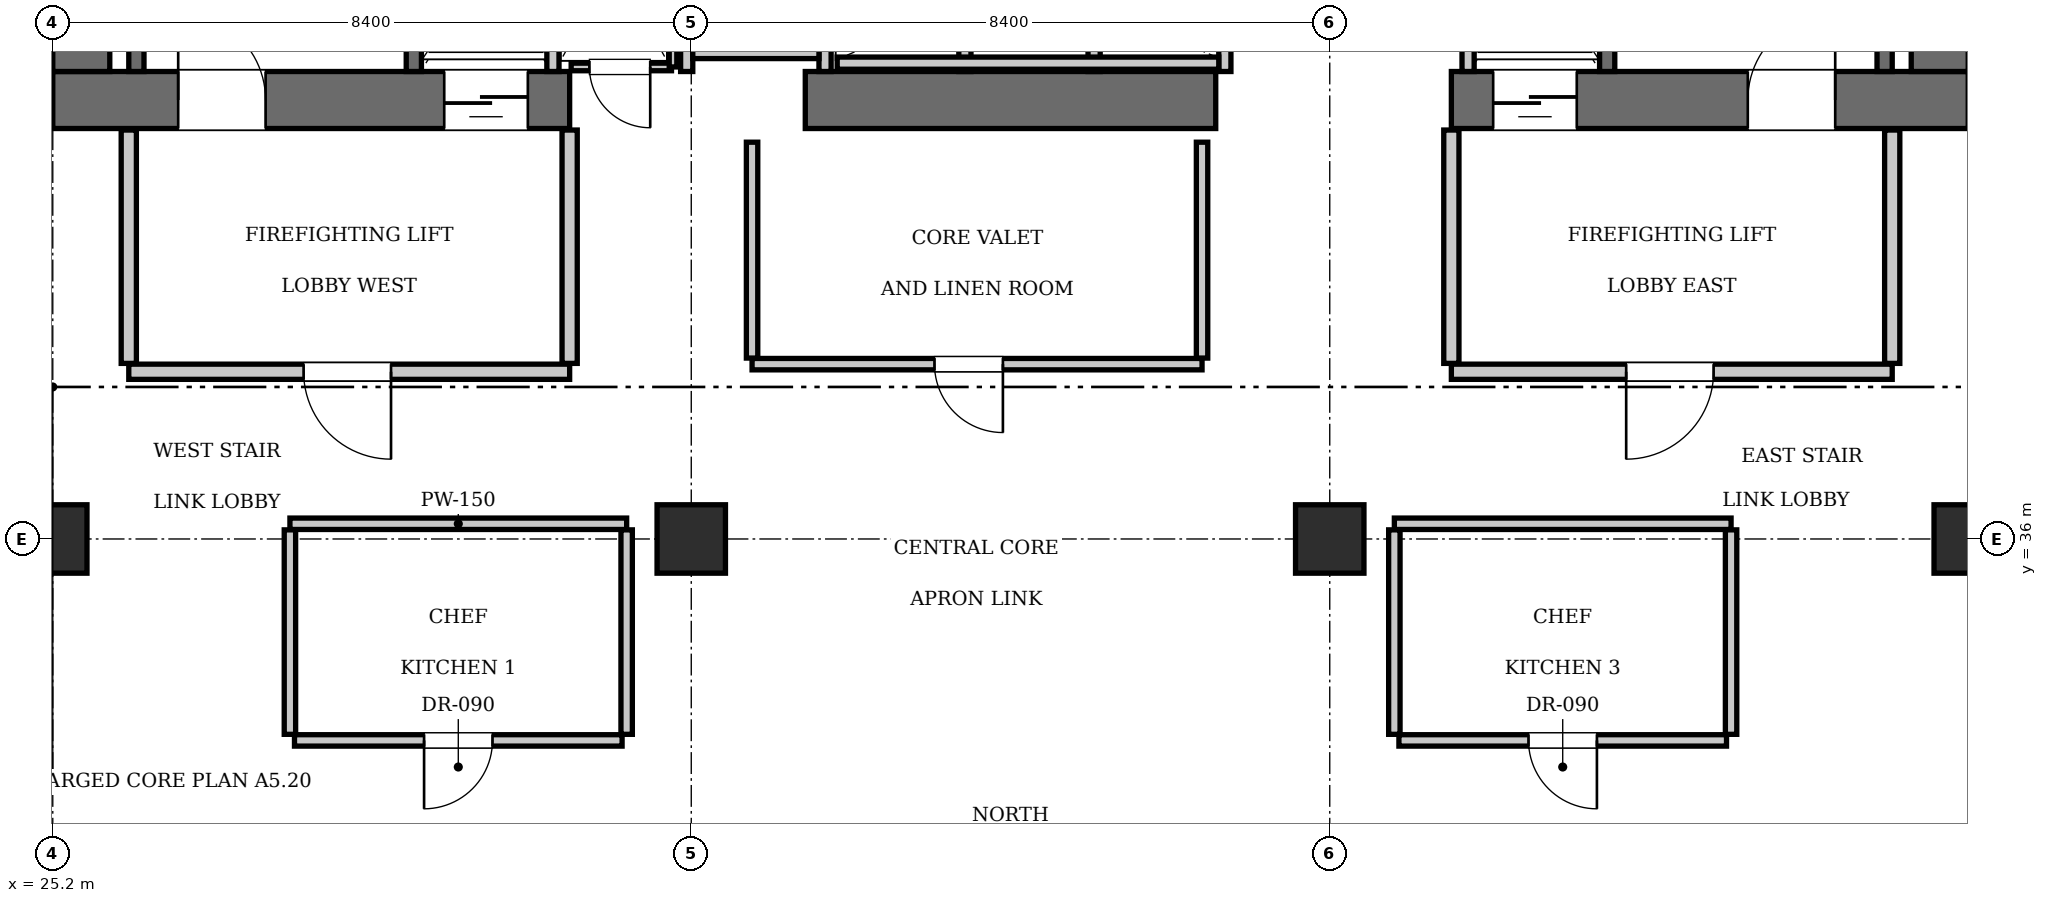
"""IFC4 building model, lengths in metres.
Left out: names, types, materials, properties, quantities, classifications, styles, units other than length and angle.
Written with IfcOpenShell. Run it as: python <this file> out.ifc"""

import sys

from ifc_helpers import new_model, si_unit, direction, frame, frame_2d, origin, origin_2d, place, context, subcontext, project, spatial, rectangle, extrude, element, fill, save


model = new_model("IFC4")
c1 = context("Model", 3, precision=1e-05, world=origin(), true_north=direction((0.0, 1.0)))
c2 = subcontext(c1, "Body", "Model", "MODEL_VIEW")
j1 = project(units=[si_unit("LENGTHUNIT", "METRE"), si_unit("PLANEANGLEUNIT", "RADIAN")], contexts=[c1])
p1 = place(None, origin())
s1 = spatial("IfcSite", under=j1, at=p1, CompositionType="ELEMENT")
p2 = place(p1, origin())
s2 = spatial("IfcBuilding", under=s1, at=p2, CompositionType="ELEMENT")
p3 = place(p2, frame((0.0, 0.0, 162.05)))
s3 = spatial("IfcBuildingStorey", under=s2, at=p3, CompositionType="ELEMENT", Elevation=162.05)
p4 = place(p3, frame((25.2, 41.775, 0.0), z_axis=(0.0, 0.0, 1.0), x_axis=(1.0, 0.0, 0.0)))
e1 = element("IfcWall", 1, at=p4, inside=s3, PredefinedType="SHEAR", context=c2, shape_type="SweptSolid", body=[
    extrude(rectangle(XDim=6.8, YDim=0.75, at=frame_2d((3.4, 0.0))), origin(), (0.0, 0.0, 1.0), 3.85),
])
p5 = place(p4, frame((1.65, 0.0, 0.0)))
e2 = element("IfcOpeningElement", 2, at=p5, cuts=e1, PredefinedType="OPENING", context=c2, shape_type="SweptSolid", body=[
    extrude(rectangle(XDim=1.15, YDim=2.15, at=frame_2d((0.575, 1.075))), frame((0.0, 0.385, 0.0), z_axis=(0.0, -1.0, 0.0), x_axis=(1.0, 0.0, 0.0)), (0.0, 0.0, 1.0), 0.77),
])
p6 = place(p4, frame((5.15, 0.0, 0.0)))
e3 = element("IfcOpeningElement", 3, at=p6, cuts=e1, PredefinedType="OPENING", context=c2, shape_type="SweptSolid", body=[
    extrude(rectangle(XDim=1.1, YDim=2.2, at=frame_2d((0.55, 1.1))), frame((0.0, 0.385, 0.0), z_axis=(0.0, -1.0, 0.0), x_axis=(1.0, 0.0, 0.0)), (0.0, 0.0, 1.0), 0.77),
])
p7 = place(p3, frame((35.1, 41.775, 0.0), z_axis=(0.0, 0.0, 1.0), x_axis=(1.0, 0.0, 0.0)))
e4 = element("IfcWall", 4, at=p7, inside=s3, PredefinedType="SHEAR", context=c2, shape_type="SweptSolid", body=[
    extrude(rectangle(XDim=5.4, YDim=0.75, at=frame_2d((2.7, 0.0))), origin(), (0.0, 0.0, 1.0), 3.85),
])
p8 = place(p3, frame((43.6, 41.775, 0.0), z_axis=(0.0, 0.0, 1.0), x_axis=(1.0, 0.0, 0.0)))
e5 = element("IfcWall", 5, at=p8, inside=s3, PredefinedType="SHEAR", context=c2, shape_type="SweptSolid", body=[
    extrude(rectangle(XDim=6.8, YDim=0.75, at=frame_2d((3.4, 0.0))), origin(), (0.0, 0.0, 1.0), 3.85),
])
p9 = place(p8, frame((3.9, 0.0, 0.0)))
e6 = element("IfcOpeningElement", 6, at=p9, cuts=e5, PredefinedType="OPENING", context=c2, shape_type="SweptSolid", body=[
    extrude(rectangle(XDim=1.15, YDim=2.15, at=frame_2d((0.575, 1.075))), frame((0.0, 0.385, 0.0), z_axis=(0.0, -1.0, 0.0), x_axis=(1.0, 0.0, 0.0)), (0.0, 0.0, 1.0), 0.77),
])
p10 = place(p8, frame((0.55, 0.0, 0.0)))
e7 = element("IfcOpeningElement", 7, at=p10, cuts=e5, PredefinedType="OPENING", context=c2, shape_type="SweptSolid", body=[
    extrude(rectangle(XDim=1.1, YDim=2.2, at=frame_2d((0.55, 1.1))), frame((0.0, 0.385, 0.0), z_axis=(0.0, -1.0, 0.0), x_axis=(1.0, 0.0, 0.0)), (0.0, 0.0, 1.0), 0.77),
])
for number, where, z_axis, x_axis in (
    (8, (25.575, 42.15, 0.0), (0.0, 0.0, 1.0), (0.0, 1.0, 0.0)),
    (9, (50.025, 42.15, 0.0), (0.0, 0.0, 1.0), (0.0, 1.0, 0.0)),
):
    element("IfcWall", number, at=place(p3, frame(where, z_axis=z_axis, x_axis=x_axis)), inside=s3, PredefinedType="SHEAR", context=c2, shape_type="SweptSolid", body=[
        extrude(rectangle(XDim=1.9, YDim=0.75, at=frame_2d((0.95, 0.0))), origin(), (0.0, 0.0, 1.0), 3.85),
    ])
for number, where, z_axis, x_axis in (
    (10, (25.2, 36.0, 0.0), (0.0, 0.0, 1.0), (1.0, 0.0, 0.0)),
    (11, (33.6, 36.0, 0.0), (0.0, 0.0, 1.0), (1.0, 0.0, 0.0)),
    (12, (42.0, 36.0, 0.0), (0.0, 0.0, 1.0), (1.0, 0.0, 0.0)),
    (13, (50.4, 36.0, 0.0), (0.0, 0.0, 1.0), (1.0, 0.0, 0.0)),
):
    element("IfcColumn", number, at=place(p3, frame(where, z_axis=z_axis, x_axis=x_axis)), inside=s3, PredefinedType="COLUMN", context=c2, shape_type="SweptSolid", body=[
        extrude(rectangle(XDim=0.9, YDim=0.9, at=origin_2d()), origin(), (0.0, 0.0, 1.0), 3.85),
    ])
p11 = place(p3, frame((29.95, 42.15, 0.0), z_axis=(0.0, 0.0, 1.0), x_axis=(0.0, 1.0, 0.0)))
e14 = element("IfcWall", 14, at=p11, inside=s3, PredefinedType="SOLIDWALL", context=c2, shape_type="SweptSolid", body=[
    extrude(rectangle(XDim=9.0, YDim=0.2, at=frame_2d((4.5, 0.0))), origin(), (0.0, 0.0, 1.0), 3.61),
])
p12 = place(p3, frame((26.3, 42.15, 0.0), z_axis=(0.0, 0.0, 1.0), x_axis=(0.0, 1.0, 0.0)))
e15 = element("IfcWall", 15, at=p12, inside=s3, PredefinedType="SOLIDWALL", context=c2, shape_type="SweptSolid", body=[
    extrude(rectangle(XDim=1.87, YDim=0.2, at=frame_2d((0.935, 0.0))), origin(), (0.0, 0.0, 1.0), 3.61),
])
p13 = place(p3, frame((45.65, 42.15, 0.0), z_axis=(0.0, 0.0, 1.0), x_axis=(0.0, 1.0, 0.0)))
e16 = element("IfcWall", 16, at=p13, inside=s3, PredefinedType="SOLIDWALL", context=c2, shape_type="SweptSolid", body=[
    extrude(rectangle(XDim=9.0, YDim=0.2, at=frame_2d((4.5, 0.0))), origin(), (0.0, 0.0, 1.0), 3.61),
])
p14 = place(p3, frame((49.3, 42.15, 0.0), z_axis=(0.0, 0.0, 1.0), x_axis=(0.0, 1.0, 0.0)))
e17 = element("IfcWall", 17, at=p14, inside=s3, PredefinedType="SOLIDWALL", context=c2, shape_type="SweptSolid", body=[
    extrude(rectangle(XDim=1.87, YDim=0.2, at=frame_2d((0.935, 0.0))), origin(), (0.0, 0.0, 1.0), 3.61),
])
for number, where, z_axis, x_axis in (
    (18, (31.78, 42.15, 0.0), (0.0, 0.0, 1.0), (0.0, 1.0, 0.0)),
    (19, (43.82, 42.15, 0.0), (0.0, 0.0, 1.0), (0.0, 1.0, 0.0)),
):
    element("IfcWall", number, at=place(p3, frame(where, z_axis=z_axis, x_axis=x_axis)), inside=s3, PredefinedType="SOLIDWALL", context=c2, shape_type="SweptSolid", body=[
        extrude(rectangle(XDim=2.59, YDim=0.16, at=frame_2d((1.295, 0.0))), origin(), (0.0, 0.0, 1.0), 3.61),
    ])
for number, where, z_axis, x_axis in (
    (20, (37.2, 42.15, 0.0), (0.0, 0.0, 1.0), (0.0, 1.0, 0.0)),
    (21, (38.9, 42.15, 0.0), (0.0, 0.0, 1.0), (0.0, 1.0, 0.0)),
    (22, (40.62, 42.15, 0.0), (0.0, 0.0, 1.0), (0.0, 1.0, 0.0)),
):
    element("IfcWall", number, at=place(p3, frame(where, z_axis=z_axis, x_axis=x_axis)), inside=s3, PredefinedType="SOLIDWALL", context=c2, shape_type="SweptSolid", body=[
        extrude(rectangle(XDim=2.2, YDim=0.16, at=frame_2d((1.1, 0.0))), origin(), (0.0, 0.0, 1.0), 3.61),
    ])
p15 = place(p3, frame((35.52, 42.26, 0.0), z_axis=(0.0, 0.0, 1.0), x_axis=(1.0, 0.0, 0.0)))
e23 = element("IfcWall", 23, at=p15, inside=s3, PredefinedType="SOLIDWALL", context=c2, shape_type="SweptSolid", body=[
    extrude(rectangle(XDim=5.02, YDim=0.16, at=frame_2d((2.51, 0.0))), origin(), (0.0, 0.0, 1.0), 3.61),
])
for number, where, z_axis, x_axis in (
    (24, (33.54, 42.15, 0.0), (0.0, 0.0, 1.0), (0.0, 1.0, 0.0)),
    (25, (35.36, 42.15, 0.0), (0.0, 0.0, 1.0), (0.0, 1.0, 0.0)),
):
    element("IfcWall", number, at=place(p3, frame(where, z_axis=z_axis, x_axis=x_axis)), inside=s3, PredefinedType="SOLIDWALL", context=c2, shape_type="SweptSolid", body=[
        extrude(rectangle(XDim=2.25, YDim=0.16, at=frame_2d((1.125, 0.0))), origin(), (0.0, 0.0, 1.0), 3.61),
    ])
p16 = place(p3, frame((33.62, 42.4, 0.0), z_axis=(0.0, 0.0, 1.0), x_axis=(1.0, 0.0, 0.0)))
e26 = element("IfcWall", 26, at=p16, inside=s3, PredefinedType="SOLIDWALL", context=c2, shape_type="SweptSolid", body=[
    extrude(rectangle(XDim=1.66, YDim=0.16, at=frame_2d((0.83, 0.0))), origin(), (0.0, 0.0, 1.0), 3.61),
])
p17 = place(p3, frame((26.2, 38.2, 0.0), z_axis=(0.0, 0.0, 1.0), x_axis=(1.0, 0.0, 0.0)))
e27 = element("IfcWall", 27, at=p17, inside=s3, PredefinedType="PARTITIONING", context=c2, shape_type="SweptSolid", body=[
    extrude(rectangle(XDim=5.8, YDim=0.2, at=frame_2d((2.9, 0.0))), origin(), (0.0, 0.0, 1.0), 3.61),
])
p18 = place(p17, frame((2.3, 0.0, 0.0)))
e28 = element("IfcOpeningElement", 28, at=p18, cuts=e27, PredefinedType="OPENING", context=c2, shape_type="SweptSolid", body=[
    extrude(rectangle(XDim=1.15, YDim=2.15, at=frame_2d((0.575, 1.075))), frame((0.0, 0.11, 0.0), z_axis=(0.0, -1.0, 0.0), x_axis=(1.0, 0.0, 0.0)), (0.0, 0.0, 1.0), 0.22),
])
for number, where, z_axis, x_axis in (
    (29, (26.2, 38.31, 0.0), (0.0, 0.0, 1.0), (0.0, 1.0, 0.0)),
    (30, (32.0, 38.31, 0.0), (0.0, 0.0, 1.0), (0.0, 1.0, 0.0)),
):
    element("IfcWall", number, at=place(p3, frame(where, z_axis=z_axis, x_axis=x_axis)), inside=s3, PredefinedType="PARTITIONING", context=c2, shape_type="SweptSolid", body=[
        extrude(rectangle(XDim=3.07, YDim=0.2, at=frame_2d((1.535, 0.0))), origin(), (0.0, 0.0, 1.0), 3.61),
    ])
p19 = place(p3, frame((43.6, 38.2, 0.0), z_axis=(0.0, 0.0, 1.0), x_axis=(1.0, 0.0, 0.0)))
e31 = element("IfcWall", 31, at=p19, inside=s3, PredefinedType="PARTITIONING", context=c2, shape_type="SweptSolid", body=[
    extrude(rectangle(XDim=5.8, YDim=0.2, at=frame_2d((2.9, 0.0))), origin(), (0.0, 0.0, 1.0), 3.61),
])
p20 = place(p19, frame((2.3, 0.0, 0.0)))
e32 = element("IfcOpeningElement", 32, at=p20, cuts=e31, PredefinedType="OPENING", context=c2, shape_type="SweptSolid", body=[
    extrude(rectangle(XDim=1.15, YDim=2.15, at=frame_2d((0.575, 1.075))), frame((0.0, 0.11, 0.0), z_axis=(0.0, -1.0, 0.0), x_axis=(1.0, 0.0, 0.0)), (0.0, 0.0, 1.0), 0.22),
])
for number, where, z_axis, x_axis in (
    (33, (43.6, 38.31, 0.0), (0.0, 0.0, 1.0), (0.0, 1.0, 0.0)),
    (34, (49.4, 38.31, 0.0), (0.0, 0.0, 1.0), (0.0, 1.0, 0.0)),
):
    element("IfcWall", number, at=place(p3, frame(where, z_axis=z_axis, x_axis=x_axis)), inside=s3, PredefinedType="PARTITIONING", context=c2, shape_type="SweptSolid", body=[
        extrude(rectangle(XDim=3.07, YDim=0.2, at=frame_2d((1.535, 0.0))), origin(), (0.0, 0.0, 1.0), 3.61),
    ])
p21 = place(p3, frame((32.02, 42.21, 0.0), z_axis=(0.0, 0.0, 1.0), x_axis=(1.0, 0.0, 0.0)))
e35 = element("IfcWall", 35, at=p21, inside=s3, PredefinedType="PARTITIONING", context=c2, shape_type="SweptSolid", body=[
    extrude(rectangle(XDim=1.32, YDim=0.1, at=frame_2d((0.66, 0.0))), origin(), (0.0, 0.0, 1.0), 3.61),
])
p22 = place(p21, frame((0.24, 0.0, 0.0)))
e36 = element("IfcOpeningElement", 36, at=p22, cuts=e35, PredefinedType="OPENING", context=c2, shape_type="SweptSolid", body=[
    extrude(rectangle(XDim=0.8, YDim=2.05, at=frame_2d((0.4, 1.025))), frame((0.0, 0.06, 0.0), z_axis=(0.0, -1.0, 0.0), x_axis=(1.0, 0.0, 0.0)), (0.0, 0.0, 1.0), 0.12),
])
p23 = place(p3, frame((33.36, 42.21, 0.0), z_axis=(0.0, 0.0, 1.0), x_axis=(0.0, 1.0, 0.0)))
e37 = element("IfcWall", 37, at=p23, inside=s3, PredefinedType="PARTITIONING", context=c2, shape_type="SweptSolid", body=[
    extrude(rectangle(XDim=2.73, YDim=0.1, at=frame_2d((1.365, 0.0))), origin(), (0.0, 0.0, 1.0), 3.61),
])
p24 = place(p3, frame((34.4, 38.3, 0.0), z_axis=(0.0, 0.0, 1.0), x_axis=(1.0, 0.0, 0.0)))
e38 = element("IfcWall", 38, at=p24, inside=s3, PredefinedType="PARTITIONING", context=c2, shape_type="SweptSolid", body=[
    extrude(rectangle(XDim=5.92, YDim=0.15, at=frame_2d((2.96, 0.0))), origin(), (0.0, 0.0, 1.0), 3.61),
])
p25 = place(p24, frame((2.4, 0.0, 0.0)))
e39 = element("IfcOpeningElement", 39, at=p25, cuts=e38, PredefinedType="OPENING", context=c2, shape_type="SweptSolid", body=[
    extrude(rectangle(XDim=0.9, YDim=2.1, at=frame_2d((0.45, 1.05))), frame((0.0, 0.085, 0.0), z_axis=(0.0, -1.0, 0.0), x_axis=(1.0, 0.0, 0.0)), (0.0, 0.0, 1.0), 0.17),
])
for number, where, z_axis, x_axis in (
    (40, (34.4, 38.38, 0.0), (0.0, 0.0, 1.0), (0.0, 1.0, 0.0)),
    (41, (40.32, 38.38, 0.0), (0.0, 0.0, 1.0), (0.0, 1.0, 0.0)),
):
    element("IfcWall", number, at=place(p3, frame(where, z_axis=z_axis, x_axis=x_axis)), inside=s3, PredefinedType="PARTITIONING", context=c2, shape_type="SweptSolid", body=[
        extrude(rectangle(XDim=2.84, YDim=0.15, at=frame_2d((1.42, 0.0))), origin(), (0.0, 0.0, 1.0), 3.61),
    ])
p26 = place(p3, frame((28.32, 36.2, 0.0), z_axis=(0.0, 0.0, 1.0), x_axis=(1.0, 0.0, 0.0)))
e42 = element("IfcWall", 42, at=p26, inside=s3, PredefinedType="PARTITIONING", context=c2, shape_type="SweptSolid", body=[
    extrude(rectangle(XDim=4.43, YDim=0.15, at=frame_2d((2.215, 0.0))), origin(), (0.0, 0.0, 1.0), 3.61),
])
for number, where, z_axis, x_axis in (
    (43, (28.32, 33.43, 0.0), (0.0, 0.0, 1.0), (0.0, 1.0, 0.0)),
    (44, (32.75, 33.43, 0.0), (0.0, 0.0, 1.0), (0.0, 1.0, 0.0)),
):
    element("IfcWall", number, at=place(p3, frame(where, z_axis=z_axis, x_axis=x_axis)), inside=s3, PredefinedType="PARTITIONING", context=c2, shape_type="SweptSolid", body=[
        extrude(rectangle(XDim=2.69, YDim=0.15, at=frame_2d((1.345, 0.0))), origin(), (0.0, 0.0, 1.0), 3.61),
    ])
p27 = place(p3, frame((28.38, 33.35, 0.0), z_axis=(0.0, 0.0, 1.0), x_axis=(1.0, 0.0, 0.0)))
e45 = element("IfcWall", 45, at=p27, inside=s3, PredefinedType="PARTITIONING", context=c2, shape_type="SweptSolid", body=[
    extrude(rectangle(XDim=4.31, YDim=0.15, at=frame_2d((2.155, 0.0))), origin(), (0.0, 0.0, 1.0), 3.61),
])
p28 = place(p27, frame((1.705, 0.0, 0.0)))
e46 = element("IfcOpeningElement", 46, at=p28, cuts=e45, PredefinedType="OPENING", context=c2, shape_type="SweptSolid", body=[
    extrude(rectangle(XDim=0.9, YDim=2.1, at=frame_2d((0.45, 1.05))), frame((0.0, 0.085, 0.0), z_axis=(0.0, -1.0, 0.0), x_axis=(1.0, 0.0, 0.0)), (0.0, 0.0, 1.0), 0.17),
])
p29 = place(p3, frame((42.85, 36.2, 0.0), z_axis=(0.0, 0.0, 1.0), x_axis=(1.0, 0.0, 0.0)))
e47 = element("IfcWall", 47, at=p29, inside=s3, PredefinedType="PARTITIONING", context=c2, shape_type="SweptSolid", body=[
    extrude(rectangle(XDim=4.43, YDim=0.15, at=frame_2d((2.215, 0.0))), origin(), (0.0, 0.0, 1.0), 3.61),
])
for number, where, z_axis, x_axis in (
    (48, (42.85, 33.43, 0.0), (0.0, 0.0, 1.0), (0.0, 1.0, 0.0)),
    (49, (47.28, 33.43, 0.0), (0.0, 0.0, 1.0), (0.0, 1.0, 0.0)),
):
    element("IfcWall", number, at=place(p3, frame(where, z_axis=z_axis, x_axis=x_axis)), inside=s3, PredefinedType="PARTITIONING", context=c2, shape_type="SweptSolid", body=[
        extrude(rectangle(XDim=2.69, YDim=0.15, at=frame_2d((1.345, 0.0))), origin(), (0.0, 0.0, 1.0), 3.61),
    ])
p30 = place(p3, frame((42.91, 33.35, 0.0), z_axis=(0.0, 0.0, 1.0), x_axis=(1.0, 0.0, 0.0)))
e50 = element("IfcWall", 50, at=p30, inside=s3, PredefinedType="PARTITIONING", context=c2, shape_type="SweptSolid", body=[
    extrude(rectangle(XDim=4.31, YDim=0.15, at=frame_2d((2.155, 0.0))), origin(), (0.0, 0.0, 1.0), 3.61),
])
p31 = place(p30, frame((1.705, 0.0, 0.0)))
e51 = element("IfcOpeningElement", 51, at=p31, cuts=e50, PredefinedType="OPENING", context=c2, shape_type="SweptSolid", body=[
    extrude(rectangle(XDim=0.9, YDim=2.1, at=frame_2d((0.45, 1.05))), frame((0.0, 0.085, 0.0), z_axis=(0.0, -1.0, 0.0), x_axis=(1.0, 0.0, 0.0)), (0.0, 0.0, 1.0), 0.17),
])
p32 = place(p5, origin())
e52 = element("IfcDoor", 52, at=p32, inside=s3, OperationType="SINGLE_SWING_LEFT", PredefinedType="DOOR", context=c2, shape_type="SweptSolid", body=[
    extrude(rectangle(XDim=1.15, YDim=2.15, at=frame_2d((0.575, 1.075))), frame((0.0, 0.025, 0.0), z_axis=(0.0, -1.0, 0.0), x_axis=(1.0, 0.0, 0.0)), (0.0, 0.0, 1.0), 0.05),
])
fill(e2, e52)
p33 = place(p9, origin())
e53 = element("IfcDoor", 53, at=p33, inside=s3, OperationType="SINGLE_SWING_RIGHT", PredefinedType="DOOR", context=c2, shape_type="SweptSolid", body=[
    extrude(rectangle(XDim=1.15, YDim=2.15, at=frame_2d((0.575, 1.075))), frame((0.0, 0.025, 0.0), z_axis=(0.0, -1.0, 0.0), x_axis=(1.0, 0.0, 0.0)), (0.0, 0.0, 1.0), 0.05),
])
fill(e6, e53)
p34 = place(p6, frame((1.1, 0.0, 0.0), z_axis=(0.0, 0.0, 1.0), x_axis=(-1.0, 0.0, 0.0)))
e54 = element("IfcDoor", 54, at=p34, inside=s3, OperationType="SLIDING_TO_LEFT", PredefinedType="DOOR", context=c2, shape_type="SweptSolid", body=[
    extrude(rectangle(XDim=1.1, YDim=2.2, at=frame_2d((0.55, 1.1))), frame((0.0, 0.025, 0.0), z_axis=(0.0, -1.0, 0.0), x_axis=(1.0, 0.0, 0.0)), (0.0, 0.0, 1.0), 0.05),
])
fill(e3, e54)
p35 = place(p10, frame((1.1, 0.0, 0.0), z_axis=(0.0, 0.0, 1.0), x_axis=(-1.0, 0.0, 0.0)))
e55 = element("IfcDoor", 55, at=p35, inside=s3, OperationType="SLIDING_TO_LEFT", PredefinedType="DOOR", context=c2, shape_type="SweptSolid", body=[
    extrude(rectangle(XDim=1.1, YDim=2.2, at=frame_2d((0.55, 1.1))), frame((0.0, 0.025, 0.0), z_axis=(0.0, -1.0, 0.0), x_axis=(1.0, 0.0, 0.0)), (0.0, 0.0, 1.0), 0.05),
])
fill(e7, e55)
p36 = place(p18, frame((1.15, 0.0, 0.0), z_axis=(0.0, 0.0, 1.0), x_axis=(-1.0, 0.0, 0.0)))
e56 = element("IfcDoor", 56, at=p36, inside=s3, OperationType="SINGLE_SWING_LEFT", PredefinedType="DOOR", context=c2, shape_type="SweptSolid", body=[
    extrude(rectangle(XDim=1.15, YDim=2.15, at=frame_2d((0.575, 1.075))), frame((0.0, 0.025, 0.0), z_axis=(0.0, -1.0, 0.0), x_axis=(1.0, 0.0, 0.0)), (0.0, 0.0, 1.0), 0.05),
])
fill(e28, e56)
p37 = place(p20, frame((1.15, 0.0, 0.0), z_axis=(0.0, 0.0, 1.0), x_axis=(-1.0, 0.0, 0.0)))
e57 = element("IfcDoor", 57, at=p37, inside=s3, OperationType="SINGLE_SWING_RIGHT", PredefinedType="DOOR", context=c2, shape_type="SweptSolid", body=[
    extrude(rectangle(XDim=1.15, YDim=2.15, at=frame_2d((0.575, 1.075))), frame((0.0, 0.025, 0.0), z_axis=(0.0, -1.0, 0.0), x_axis=(1.0, 0.0, 0.0)), (0.0, 0.0, 1.0), 0.05),
])
fill(e32, e57)
p38 = place(p22, frame((0.8, 0.0, 0.0), z_axis=(0.0, 0.0, 1.0), x_axis=(-1.0, 0.0, 0.0)))
e58 = element("IfcDoor", 58, at=p38, inside=s3, OperationType="SINGLE_SWING_LEFT", PredefinedType="DOOR", context=c2, shape_type="SweptSolid", body=[
    extrude(rectangle(XDim=0.8, YDim=2.05, at=frame_2d((0.4, 1.025))), frame((0.0, 0.025, 0.0), z_axis=(0.0, -1.0, 0.0), x_axis=(1.0, 0.0, 0.0)), (0.0, 0.0, 1.0), 0.05),
])
fill(e36, e58)
p39 = place(p25, frame((0.9, 0.0, 0.0), z_axis=(0.0, 0.0, 1.0), x_axis=(-1.0, 0.0, 0.0)))
e59 = element("IfcDoor", 59, at=p39, inside=s3, OperationType="SINGLE_SWING_LEFT", PredefinedType="DOOR", context=c2, shape_type="SweptSolid", body=[
    extrude(rectangle(XDim=0.9, YDim=2.1, at=frame_2d((0.45, 1.05))), frame((0.0, 0.025, 0.0), z_axis=(0.0, -1.0, 0.0), x_axis=(1.0, 0.0, 0.0)), (0.0, 0.0, 1.0), 0.05),
])
fill(e39, e59)
p40 = place(p28, frame((0.9, 0.0, 0.0), z_axis=(0.0, 0.0, 1.0), x_axis=(-1.0, 0.0, 0.0)))
e60 = element("IfcDoor", 60, at=p40, inside=s3, OperationType="SINGLE_SWING_RIGHT", PredefinedType="DOOR", context=c2, shape_type="SweptSolid", body=[
    extrude(rectangle(XDim=0.9, YDim=2.1, at=frame_2d((0.45, 1.05))), frame((0.0, 0.025, 0.0), z_axis=(0.0, -1.0, 0.0), x_axis=(1.0, 0.0, 0.0)), (0.0, 0.0, 1.0), 0.05),
])
fill(e46, e60)
p41 = place(p31, frame((0.9, 0.0, 0.0), z_axis=(0.0, 0.0, 1.0), x_axis=(-1.0, 0.0, 0.0)))
e61 = element("IfcDoor", 61, at=p41, inside=s3, OperationType="SINGLE_SWING_LEFT", PredefinedType="DOOR", context=c2, shape_type="SweptSolid", body=[
    extrude(rectangle(XDim=0.9, YDim=2.1, at=frame_2d((0.45, 1.05))), frame((0.0, 0.025, 0.0), z_axis=(0.0, -1.0, 0.0), x_axis=(1.0, 0.0, 0.0)), (0.0, 0.0, 1.0), 0.05),
])
fill(e51, e61)
save(model, sys.argv[1])
